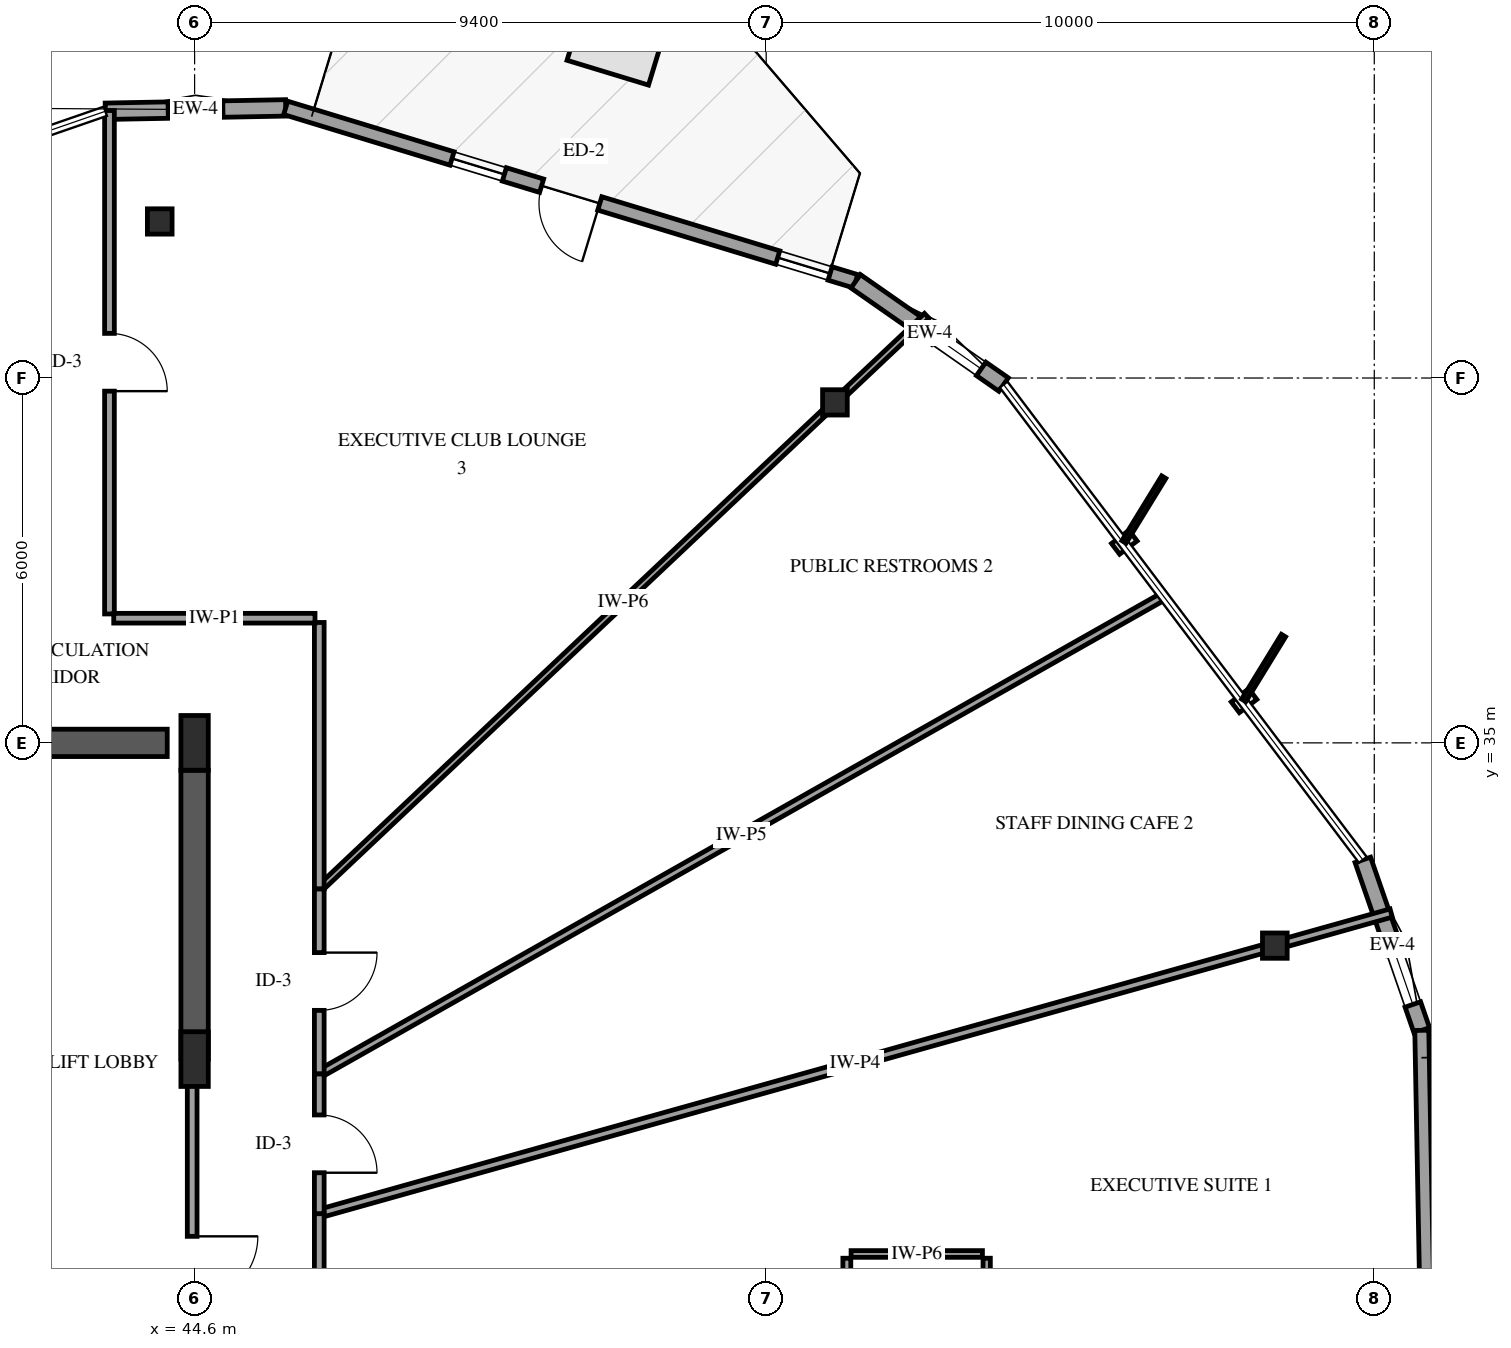
"""IFC4 building model, lengths in metres.
Left out: names, types, materials, properties, quantities, classifications, styles, units other than length and angle.
Written with IfcOpenShell. Run it as: python <this file> out.ifc"""

import sys

from ifc_helpers import new_model, si_unit, direction, frame, frame_2d, origin, origin_2d, place, context, subcontext, project, spatial, rectangle, i_section, extrude, element, fill, save


model = new_model("IFC4")
c1 = context("Model", 3, precision=1e-05, world=origin(), true_north=direction((0.0, 1.0)))
c2 = subcontext(c1, "Body", "Model", "MODEL_VIEW")
j1 = project(units=[si_unit("LENGTHUNIT", "METRE"), si_unit("PLANEANGLEUNIT", "RADIAN")], contexts=[c1])
p1 = place(None, origin())
s1 = spatial("IfcSite", under=j1, at=p1, CompositionType="ELEMENT")
p2 = place(p1, origin())
s2 = spatial("IfcBuilding", under=s1, at=p2, CompositionType="ELEMENT")
p3 = place(p2, frame((0.0, 0.0, 233.8)))
s3 = spatial("IfcBuildingStorey", under=s2, at=p3, CompositionType="ELEMENT", Elevation=233.8)
p4 = place(p3, frame((41.3, 35.0, 0.0), z_axis=(0.0, 0.0, 1.0), x_axis=(1.0, 0.0, 0.0)))
e1 = element("IfcWall", 1, at=p4, inside=s3, PredefinedType="SHEAR", context=c2, shape_type="SweptSolid", body=[
    extrude(rectangle(XDim=2.85, YDim=0.45, at=frame_2d((1.425, 0.0))), origin(), (0.0, 0.0, 1.0), 3.6),
])
p5 = place(p3, frame((44.6, 29.8, 0.0), z_axis=(0.0, 0.0, 1.0), x_axis=(0.0, 1.0, 0.0)))
e2 = element("IfcWall", 2, at=p5, inside=s3, PredefinedType="SHEAR", context=c2, shape_type="SweptSolid", body=[
    extrude(rectangle(XDim=4.75, YDim=0.45, at=frame_2d((2.375, 0.0))), origin(), (0.0, 0.0, 1.0), 3.6),
])
for number, where, z_axis, x_axis in (
    (3, (44.6, 29.8, 0.0), (0.0, 0.0, 1.0), (1.0, 0.0, 0.0)),
    (4, (44.6, 35.0, 0.0), (0.0, 0.0, 1.0), (1.0, 0.0, 0.0)),
):
    element("IfcColumn", number, at=place(p3, frame(where, z_axis=z_axis, x_axis=x_axis)), inside=s3, PredefinedType="PILASTER", context=c2, shape_type="SweptSolid", body=[
        extrude(rectangle(XDim=0.45, YDim=0.9, at=origin_2d()), origin(), (0.0, 0.0, 1.0), 3.6),
    ])
for number, where, z_axis, x_axis in (
    (5, (62.365, 31.666, 0.0), (0.0, 0.0, 1.0), (1.0, 0.0, 0.0)),
    (6, (55.13, 40.599, 0.0), (0.0, 0.0, 1.0), (1.0, 0.0, 0.0)),
    (7, (44.027, 43.574, 0.0), (0.0, 0.0, 1.0), (1.0, 0.0, 0.0)),
):
    element("IfcColumn", number, at=place(p3, frame(where, z_axis=z_axis, x_axis=x_axis)), inside=s3, PredefinedType="COLUMN", context=c2, shape_type="SweptSolid", body=[
        extrude(i_section(OverallWidth=0.406, OverallDepth=0.416, WebThickness=0.03, FlangeThickness=0.048, FilletRadius=0.038, at=origin_2d()), origin(), (0.0, 0.0, 1.0), 3.6),
    ])
p6 = place(p3, frame((46.098, 45.442, 0.0), z_axis=(0.0, 0.0, 1.0), x_axis=(-0.999822399495, -0.018845940364, 0.0)))
e8 = element("IfcWall", 8, at=p6, inside=s3, PredefinedType="SOLIDWALL", context=c2, shape_type="SweptSolid", body=[
    extrude(rectangle(XDim=2.967, YDim=0.27, at=frame_2d((1.483, 0.0))), origin(), (0.0, 0.0, 1.0), 2.599),
])
p7 = place(p6, frame((1.033, 0.0, 0.75)))
e9 = element("IfcOpeningElement", 9, at=p7, cuts=e8, PredefinedType="OPENING", context=c2, shape_type="SweptSolid", body=[
    extrude(rectangle(XDim=0.9, YDim=1.5, at=frame_2d((0.45, 0.75))), frame((0.0, 0.145, 0.0), z_axis=(0.0, -1.0, 0.0), x_axis=(1.0, 0.0, 0.0)), (0.0, 0.0, 1.0), 0.29),
])
p8 = place(p3, frame((55.472, 42.591, 0.0), z_axis=(0.0, 0.0, 1.0), x_axis=(-0.956709483024, 0.29104461014, 0.0)))
e10 = element("IfcWall", 10, at=p8, inside=s3, PredefinedType="SOLIDWALL", context=c2, shape_type="SweptSolid", body=[
    extrude(rectangle(XDim=9.798, YDim=0.23, at=frame_2d((4.899, 0.0))), origin(), (0.0, 0.0, 1.0), 2.599),
])
p9 = place(p8, frame((4.399, 0.0, 0.0)))
e11 = element("IfcOpeningElement", 11, at=p9, cuts=e10, PredefinedType="OPENING", context=c2, shape_type="SweptSolid", body=[
    extrude(rectangle(XDim=1.0, YDim=2.15, at=frame_2d((0.5, 1.075))), frame((0.0, 0.125, 0.0), z_axis=(0.0, -1.0, 0.0), x_axis=(1.0, 0.0, 0.0)), (0.0, 0.0, 1.0), 0.25),
])
p10 = place(p8, frame((0.44, 0.0, 0.72)))
e12 = element("IfcOpeningElement", 12, at=p10, cuts=e10, PredefinedType="OPENING", context=c2, shape_type="SweptSolid", body=[
    extrude(rectangle(XDim=0.9, YDim=1.5, at=frame_2d((0.45, 0.75))), frame((0.0, 0.125, 0.0), z_axis=(0.0, -1.0, 0.0), x_axis=(1.0, 0.0, 0.0)), (0.0, 0.0, 1.0), 0.25),
])
p11 = place(p8, frame((6.039, 0.0, 0.72)))
e13 = element("IfcOpeningElement", 13, at=p11, cuts=e10, PredefinedType="OPENING", context=c2, shape_type="SweptSolid", body=[
    extrude(rectangle(XDim=0.9, YDim=1.5, at=frame_2d((0.45, 0.75))), frame((0.0, 0.125, 0.0), z_axis=(0.0, -1.0, 0.0), x_axis=(1.0, 0.0, 0.0)), (0.0, 0.0, 1.0), 0.25),
])
p12 = place(p3, frame((64.781, 30.273, 0.0), z_axis=(0.0, 0.0, 1.0), x_axis=(-0.326898552416, 0.945059435395, 0.0)))
e14 = element("IfcWall", 14, at=p12, inside=s3, PredefinedType="SOLIDWALL", context=c2, shape_type="SweptSolid", body=[
    extrude(rectangle(XDim=2.967, YDim=0.27, at=frame_2d((1.483, 0.0))), origin(), (0.0, 0.0, 1.0), 2.599),
])
p13 = place(p12, frame((0.45, 0.0, 0.75)))
e15 = element("IfcOpeningElement", 15, at=p13, cuts=e14, PredefinedType="OPENING", context=c2, shape_type="SweptSolid", body=[
    extrude(rectangle(XDim=0.9, YDim=1.5, at=frame_2d((0.45, 0.75))), frame((0.0, 0.145, 0.0), z_axis=(0.0, -1.0, 0.0), x_axis=(1.0, 0.0, 0.0)), (0.0, 0.0, 1.0), 0.29),
])
p14 = place(p3, frame((64.966, 20.477, 0.0), z_axis=(0.0, 0.0, 1.0), x_axis=(-0.018838247523, 0.99982254447, 0.0)))
e16 = element("IfcWall", 16, at=p14, inside=s3, PredefinedType="SOLIDWALL", context=c2, shape_type="SweptSolid", body=[
    extrude(rectangle(XDim=9.798, YDim=0.23, at=frame_2d((4.899, 0.0))), origin(), (0.0, 0.0, 1.0), 2.599),
])
p15 = place(p14, frame((4.399, 0.0, 0.0)))
e17 = element("IfcOpeningElement", 17, at=p15, cuts=e16, PredefinedType="OPENING", context=c2, shape_type="SweptSolid", body=[
    extrude(rectangle(XDim=1.0, YDim=2.15, at=frame_2d((0.5, 1.075))), frame((0.0, 0.125, 0.0), z_axis=(0.0, -1.0, 0.0), x_axis=(1.0, 0.0, 0.0)), (0.0, 0.0, 1.0), 0.25),
])
p16 = place(p3, frame((57.904, 40.893, 0.0), z_axis=(0.0, 0.0, 1.0), x_axis=(-0.81995808367, 0.572423567845, 0.0)))
e18 = element("IfcWall", 18, at=p16, inside=s3, PredefinedType="SOLIDWALL", context=c2, shape_type="SweptSolid", body=[
    extrude(rectangle(XDim=2.967, YDim=0.27, at=frame_2d((1.483, 0.0))), origin(), (0.0, 0.0, 1.0), 2.599),
])
p17 = place(p16, frame((0.45, 0.0, 0.75)))
e19 = element("IfcOpeningElement", 19, at=p17, cuts=e18, PredefinedType="OPENING", context=c2, shape_type="SweptSolid", body=[
    extrude(rectangle(XDim=0.9, YDim=1.5, at=frame_2d((0.45, 0.75))), frame((0.0, 0.145, 0.0), z_axis=(0.0, -1.0, 0.0), x_axis=(1.0, 0.0, 0.0)), (0.0, 0.0, 1.0), 0.29),
])
p18 = place(p3, frame((46.65, 27.258, 0.0), z_axis=(0.0, 0.0, 1.0), x_axis=(0.962851062981, 0.270033017455, 0.0)))
e20 = element("IfcWall", 20, at=p18, inside=s3, PredefinedType="PARTITIONING", context=c2, shape_type="SweptSolid", body=[
    extrude(rectangle(XDim=18.308, YDim=0.14, at=frame_2d((9.154, 0.0))), origin(), (0.0, 0.0, 1.0), 2.431),
])
p19 = place(p3, frame((46.65, 29.555, 0.0), z_axis=(0.0, 0.0, 1.0), x_axis=(0.870317622411, 0.492490848769, 0.0)))
e21 = element("IfcWall", 21, at=p19, inside=s3, PredefinedType="PARTITIONING", context=c2, shape_type="SweptSolid", body=[
    extrude(rectangle(XDim=15.954, YDim=0.13, at=frame_2d((7.977, 0.0))), origin(), (0.0, 0.0, 1.0), 3.26),
])
p20 = place(p3, frame((46.65, 32.597, 0.0), z_axis=(0.0, 0.0, 1.0), x_axis=(0.727338908676, 0.686278450722, 0.0)))
e22 = element("IfcWall", 22, at=p20, inside=s3, PredefinedType="PARTITIONING", context=c2, shape_type="SweptSolid", body=[
    extrude(rectangle(XDim=13.735, YDim=0.11, at=frame_2d((6.868, 0.0))), origin(), (0.0, 0.0, 1.0), 2.515),
])
p21 = place(p3, frame((43.2, 45.399, 0.0), z_axis=(0.0, 0.0, 1.0), x_axis=(0.0, -1.0, 0.0)))
e23 = element("IfcWall", 23, at=p21, inside=s3, PredefinedType="PARTITIONING", context=c2, shape_type="SweptSolid", body=[
    extrude(rectangle(XDim=8.279, YDim=0.16, at=frame_2d((4.139, 0.0))), origin(), (0.0, 0.0, 1.0), 2.515),
])
p22 = place(p21, frame((3.665, 0.0, 0.0)))
e24 = element("IfcOpeningElement", 24, at=p22, cuts=e23, PredefinedType="OPENING", context=c2, shape_type="SweptSolid", body=[
    extrude(rectangle(XDim=0.95, YDim=2.15, at=frame_2d((0.475, 1.075))), frame((0.0, 0.09, 0.0), z_axis=(0.0, -1.0, 0.0), x_axis=(1.0, 0.0, 0.0)), (0.0, 0.0, 1.0), 0.18),
])
p23 = place(p3, frame((44.56, 29.8, 0.0), z_axis=(0.0, 0.0, 1.0), x_axis=(0.0, -1.0, 0.0)))
e25 = element("IfcWall", 25, at=p23, inside=s3, PredefinedType="PARTITIONING", context=c2, shape_type="SweptSolid", body=[
    extrude(rectangle(XDim=6.91, YDim=0.16, at=frame_2d((3.455, 0.0))), origin(), (0.0, 0.0, 1.0), 2.26),
])
p24 = place(p23, frame((2.915, 0.0, 0.0)))
e26 = element("IfcOpeningElement", 26, at=p24, cuts=e25, PredefinedType="OPENING", context=c2, shape_type="SweptSolid", body=[
    extrude(rectangle(XDim=1.08, YDim=2.15, at=frame_2d((0.54, 1.075))), frame((0.0, 0.09, 0.0), z_axis=(0.0, -1.0, 0.0), x_axis=(1.0, 0.0, 0.0)), (0.0, 0.0, 1.0), 0.18),
])
p25 = place(p3, frame((46.65, 36.98, 0.0), z_axis=(0.0, 0.0, 1.0), x_axis=(0.0, -1.0, 0.0)))
e27 = element("IfcWall", 27, at=p25, inside=s3, PredefinedType="PARTITIONING", context=c2, shape_type="SweptSolid", body=[
    extrude(rectangle(XDim=4.383, YDim=0.16, at=frame_2d((2.191, 0.0))), origin(), (0.0, 0.0, 1.0), 3.26),
])
p26 = place(p3, frame((46.65, 27.258, 0.0), z_axis=(0.0, 0.0, 1.0), x_axis=(0.0, -1.0, 0.0)))
e28 = element("IfcWall", 28, at=p26, inside=s3, PredefinedType="PARTITIONING", context=c2, shape_type="SweptSolid", body=[
    extrude(rectangle(XDim=3.848, YDim=0.16, at=frame_2d((1.924, 0.0))), origin(), (0.0, 0.0, 1.0), 3.26),
])
p27 = place(p26, frame((1.449, 0.0, 0.0)))
e29 = element("IfcOpeningElement", 29, at=p27, cuts=e28, PredefinedType="OPENING", context=c2, shape_type="SweptSolid", body=[
    extrude(rectangle(XDim=0.95, YDim=2.15, at=frame_2d((0.475, 1.075))), frame((0.0, 0.09, 0.0), z_axis=(0.0, -1.0, 0.0), x_axis=(1.0, 0.0, 0.0)), (0.0, 0.0, 1.0), 0.18),
])
p28 = place(p3, frame((43.27, 37.05, 0.0), z_axis=(0.0, 0.0, 1.0), x_axis=(1.0, 0.0, 0.0)))
e30 = element("IfcWall", 30, at=p28, inside=s3, PredefinedType="PARTITIONING", context=c2, shape_type="SweptSolid", body=[
    extrude(rectangle(XDim=3.31, YDim=0.16, at=frame_2d((1.655, 0.0))), origin(), (0.0, 0.0, 1.0), 3.26),
])
p29 = place(p3, frame((46.65, 32.597, 0.0), z_axis=(0.0, 0.0, 1.0), x_axis=(0.0, -1.0, 0.0)))
e31 = element("IfcWall", 31, at=p29, inside=s3, PredefinedType="PARTITIONING", context=c2, shape_type="SweptSolid", body=[
    extrude(rectangle(XDim=3.042, YDim=0.16, at=frame_2d((1.521, 0.0))), origin(), (0.0, 0.0, 1.0), 3.26),
])
p30 = place(p29, frame((1.046, 0.0, 0.0)))
e32 = element("IfcOpeningElement", 32, at=p30, cuts=e31, PredefinedType="OPENING", context=c2, shape_type="SweptSolid", body=[
    extrude(rectangle(XDim=0.95, YDim=2.15, at=frame_2d((0.475, 1.075))), frame((0.0, 0.09, 0.0), z_axis=(0.0, -1.0, 0.0), x_axis=(1.0, 0.0, 0.0)), (0.0, 0.0, 1.0), 0.18),
])
p31 = place(p3, frame((46.65, 29.555, 0.0), z_axis=(0.0, 0.0, 1.0), x_axis=(0.0, -1.0, 0.0)))
e33 = element("IfcWall", 33, at=p31, inside=s3, PredefinedType="PARTITIONING", context=c2, shape_type="SweptSolid", body=[
    extrude(rectangle(XDim=2.297, YDim=0.16, at=frame_2d((1.148, 0.0))), origin(), (0.0, 0.0, 1.0), 3.26),
])
p32 = place(p31, frame((0.674, 0.0, 0.0)))
e34 = element("IfcOpeningElement", 34, at=p32, cuts=e33, PredefinedType="OPENING", context=c2, shape_type="SweptSolid", body=[
    extrude(rectangle(XDim=0.95, YDim=2.15, at=frame_2d((0.475, 1.075))), frame((0.0, 0.09, 0.0), z_axis=(0.0, -1.0, 0.0), x_axis=(1.0, 0.0, 0.0)), (0.0, 0.0, 1.0), 0.18),
])
p33 = place(p3, frame((55.326, 26.525, 0.0), z_axis=(0.0, 0.0, 1.0), x_axis=(0.0, -1.0, 0.0)))
e35 = element("IfcWall", 35, at=p33, inside=s3, PredefinedType="PARTITIONING", context=c2, shape_type="SweptSolid", body=[
    extrude(rectangle(XDim=2.16, YDim=0.13, at=frame_2d((1.08, 0.0))), origin(), (0.0, 0.0, 1.0), 3.26),
])
p34 = place(p33, frame((0.655, 0.0, 0.0)))
e36 = element("IfcOpeningElement", 36, at=p34, cuts=e35, PredefinedType="OPENING", context=c2, shape_type="SweptSolid", body=[
    extrude(rectangle(XDim=0.85, YDim=2.1, at=frame_2d((0.425, 1.05))), frame((0.0, 0.075, 0.0), z_axis=(0.0, -1.0, 0.0), x_axis=(1.0, 0.0, 0.0)), (0.0, 0.0, 1.0), 0.15),
])
p35 = place(p3, frame((57.626, 24.365, 0.0), z_axis=(0.0, 0.0, 1.0), x_axis=(0.0, 1.0, 0.0)))
e37 = element("IfcWall", 37, at=p35, inside=s3, PredefinedType="PARTITIONING", context=c2, shape_type="SweptSolid", body=[
    extrude(rectangle(XDim=2.16, YDim=0.12, at=frame_2d((1.08, 0.0))), origin(), (0.0, 0.0, 1.0), 3.26),
])
p36 = place(p3, frame((57.556, 26.595, 0.0), z_axis=(0.0, 0.0, 1.0), x_axis=(-1.0, 0.0, 0.0)))
e38 = element("IfcWall", 38, at=p36, inside=s3, PredefinedType="PARTITIONING", context=c2, shape_type="SweptSolid", body=[
    extrude(rectangle(XDim=2.16, YDim=0.11, at=frame_2d((1.08, 0.0))), origin(), (0.0, 0.0, 1.0), 3.26),
])
p37 = place(p7, origin())
e39 = element("IfcWindow", 39, at=p37, inside=s3, PartitioningType="SINGLE_PANEL", PredefinedType="WINDOW", context=c2, shape_type="SweptSolid", body=[
    extrude(rectangle(XDim=0.9, YDim=1.5, at=frame_2d((0.45, 0.75))), frame((0.0, 0.03, 0.0), z_axis=(0.0, -1.0, 0.0), x_axis=(1.0, 0.0, 0.0)), (0.0, 0.0, 1.0), 0.06),
])
fill(e9, e39)
p38 = place(p9, origin())
e40 = element("IfcDoor", 40, at=p38, inside=s3, OperationType="SINGLE_SWING_LEFT", PredefinedType="DOOR", context=c2, shape_type="SweptSolid", body=[
    extrude(rectangle(XDim=1.0, YDim=2.15, at=frame_2d((0.5, 1.075))), frame((0.0, 0.025, 0.0), z_axis=(0.0, -1.0, 0.0), x_axis=(1.0, 0.0, 0.0)), (0.0, 0.0, 1.0), 0.05),
])
fill(e11, e40)
p39 = place(p10, origin())
e41 = element("IfcWindow", 41, at=p39, inside=s3, PartitioningType="SINGLE_PANEL", PredefinedType="WINDOW", context=c2, shape_type="SweptSolid", body=[
    extrude(rectangle(XDim=0.9, YDim=1.5, at=frame_2d((0.45, 0.75))), frame((0.0, 0.03, 0.0), z_axis=(0.0, -1.0, 0.0), x_axis=(1.0, 0.0, 0.0)), (0.0, 0.0, 1.0), 0.06),
])
fill(e12, e41)
p40 = place(p11, origin())
e42 = element("IfcWindow", 42, at=p40, inside=s3, PartitioningType="SINGLE_PANEL", PredefinedType="WINDOW", context=c2, shape_type="SweptSolid", body=[
    extrude(rectangle(XDim=0.9, YDim=1.5, at=frame_2d((0.45, 0.75))), frame((0.0, 0.03, 0.0), z_axis=(0.0, -1.0, 0.0), x_axis=(1.0, 0.0, 0.0)), (0.0, 0.0, 1.0), 0.06),
])
fill(e13, e42)
p41 = place(p13, origin())
e43 = element("IfcWindow", 43, at=p41, inside=s3, PartitioningType="SINGLE_PANEL", PredefinedType="WINDOW", context=c2, shape_type="SweptSolid", body=[
    extrude(rectangle(XDim=0.9, YDim=1.5, at=frame_2d((0.45, 0.75))), frame((0.0, 0.03, 0.0), z_axis=(0.0, -1.0, 0.0), x_axis=(1.0, 0.0, 0.0)), (0.0, 0.0, 1.0), 0.06),
])
fill(e15, e43)
p42 = place(p17, origin())
e44 = element("IfcWindow", 44, at=p42, inside=s3, PartitioningType="SINGLE_PANEL", PredefinedType="WINDOW", context=c2, shape_type="SweptSolid", body=[
    extrude(rectangle(XDim=0.9, YDim=1.5, at=frame_2d((0.45, 0.75))), frame((0.0, 0.03, 0.0), z_axis=(0.0, -1.0, 0.0), x_axis=(1.0, 0.0, 0.0)), (0.0, 0.0, 1.0), 0.06),
])
fill(e19, e44)
p43 = place(p22, origin())
e45 = element("IfcDoor", 45, at=p43, inside=s3, OperationType="SINGLE_SWING_RIGHT", PredefinedType="DOOR", context=c2, shape_type="SweptSolid", body=[
    extrude(rectangle(XDim=0.95, YDim=2.15, at=frame_2d((0.475, 1.075))), frame((0.0, 0.025, 0.0), z_axis=(0.0, -1.0, 0.0), x_axis=(1.0, 0.0, 0.0)), (0.0, 0.0, 1.0), 0.05),
])
fill(e24, e45)
p44 = place(p24, origin())
e46 = element("IfcDoor", 46, at=p44, inside=s3, OperationType="SINGLE_SWING_LEFT", PredefinedType="DOOR", context=c2, shape_type="SweptSolid", body=[
    extrude(rectangle(XDim=1.08, YDim=2.15, at=frame_2d((0.54, 1.075))), frame((0.0, 0.025, 0.0), z_axis=(0.0, -1.0, 0.0), x_axis=(1.0, 0.0, 0.0)), (0.0, 0.0, 1.0), 0.05),
])
fill(e26, e46)
p45 = place(p30, origin())
e47 = element("IfcDoor", 47, at=p45, inside=s3, OperationType="SINGLE_SWING_LEFT", PredefinedType="DOOR", context=c2, shape_type="SweptSolid", body=[
    extrude(rectangle(XDim=0.95, YDim=2.15, at=frame_2d((0.475, 1.075))), frame((0.0, 0.025, 0.0), z_axis=(0.0, -1.0, 0.0), x_axis=(1.0, 0.0, 0.0)), (0.0, 0.0, 1.0), 0.05),
])
fill(e32, e47)
p46 = place(p32, origin())
e48 = element("IfcDoor", 48, at=p46, inside=s3, OperationType="SINGLE_SWING_RIGHT", PredefinedType="DOOR", context=c2, shape_type="SweptSolid", body=[
    extrude(rectangle(XDim=0.95, YDim=2.15, at=frame_2d((0.475, 1.075))), frame((0.0, 0.025, 0.0), z_axis=(0.0, -1.0, 0.0), x_axis=(1.0, 0.0, 0.0)), (0.0, 0.0, 1.0), 0.05),
])
fill(e34, e48)
save(model, sys.argv[1])
